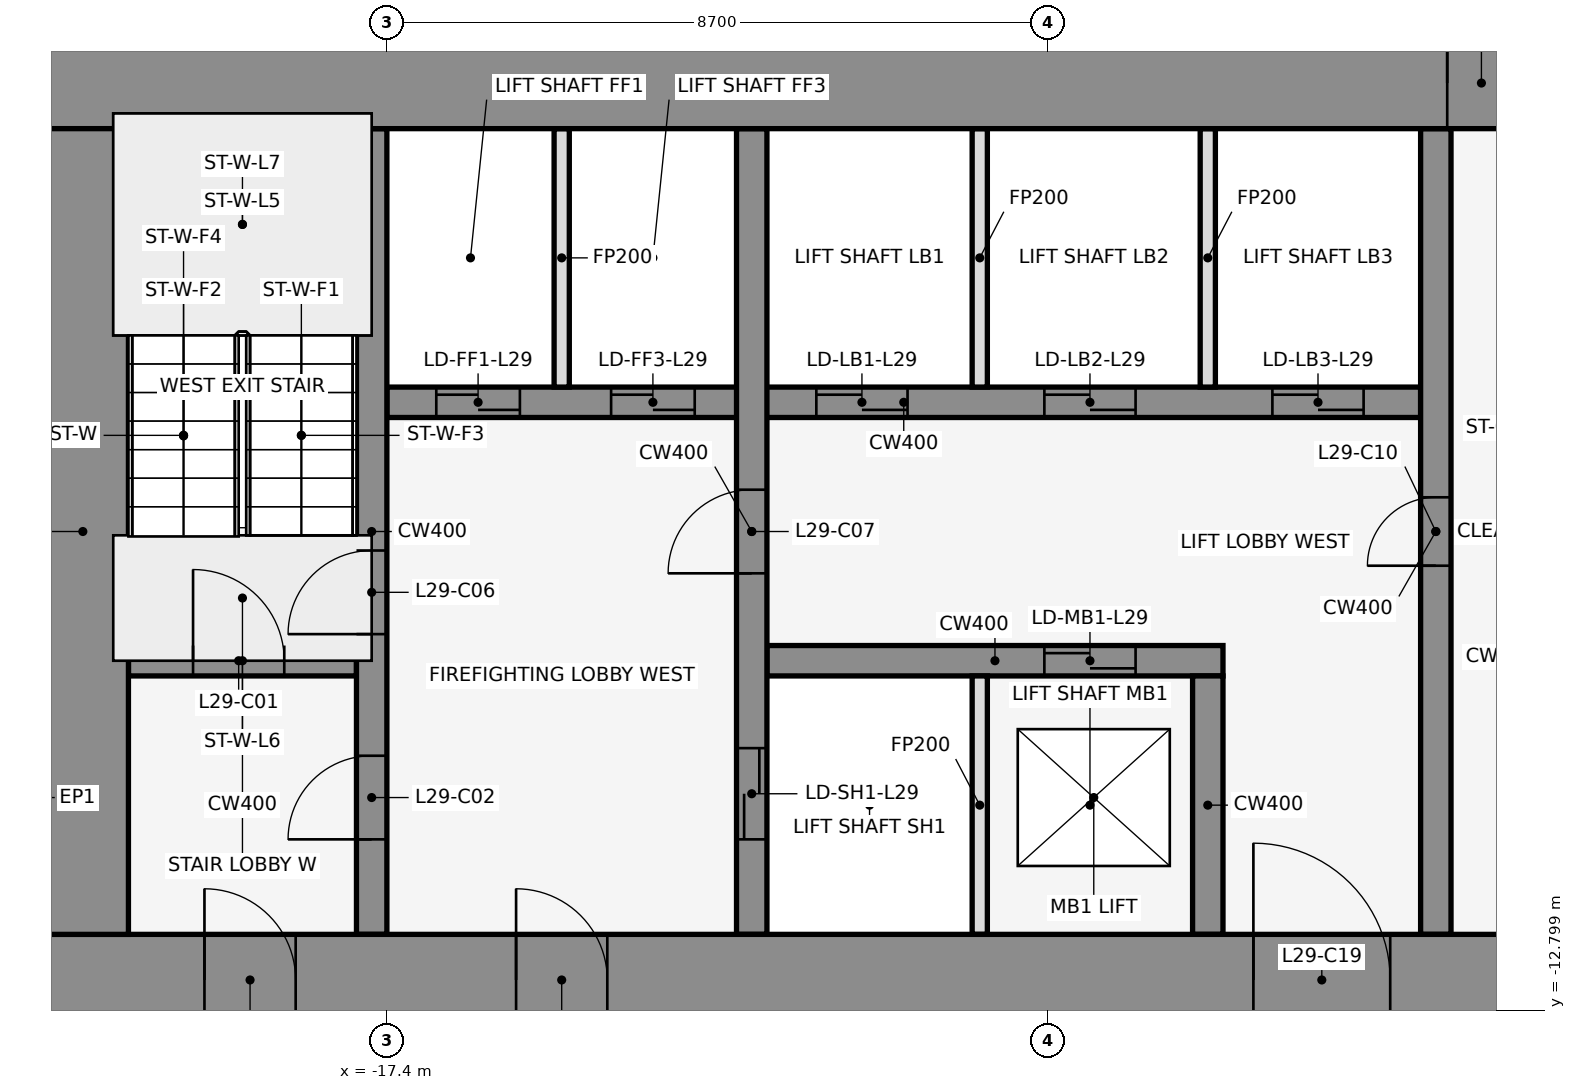
"""IFC4 building model, lengths in metres.
Left out: names, types, materials, properties, quantities, classifications, styles, units other than length and angle.
Written with IfcOpenShell. Run it as: python <this file> out.ifc"""

import sys

from ifc_helpers import new_model, si_unit, direction, frame, frame_2d, origin, place, context, subcontext, project, spatial, rectangle, extrude, element, fill, save


model = new_model("IFC4")
c1 = context("Model", 3, precision=1e-05, world=origin(), true_north=direction((0.0, 1.0)))
c2 = subcontext(c1, "Body", "Model", "MODEL_VIEW")
j1 = project(units=[si_unit("LENGTHUNIT", "METRE"), si_unit("PLANEANGLEUNIT", "RADIAN")], contexts=[c1])
p1 = place(None, origin())
s1 = spatial("IfcSite", under=j1, at=p1, CompositionType="ELEMENT")
p2 = place(p1, origin())
s2 = spatial("IfcBuilding", under=s1, at=p2, CompositionType="ELEMENT")
p3 = place(p2, frame((0.0, 0.0, 135.0)))
s3 = spatial("IfcBuildingStorey", under=s2, at=p3, CompositionType="ELEMENT", Elevation=135.0)
p4 = place(p3, frame((-14.599, 1.08, 0.0), z_axis=(0.0, 0.0, 1.0), x_axis=(-0.83981312244, -0.542875602121, 0.0)))
e1 = element("IfcWall", 1, at=p4, inside=s3, PredefinedType="STANDARD", context=c2, shape_type="SweptSolid", body=[
    extrude(rectangle(XDim=2.183, YDim=0.25, at=frame_2d((1.091, 0.0))), origin(), (0.0, 0.0, 1.0), 5.25),
])
p5 = place(p3, frame((-20.8, -8.2, 0.0), z_axis=(0.0, 0.0, 1.0), x_axis=(1.0, 0.0, 0.0)))
e2 = element("IfcWall", 2, at=p5, inside=s3, PredefinedType="SHEAR", context=c2, shape_type="SweptSolid", body=[
    extrude(rectangle(XDim=3.0, YDim=0.4, at=frame_2d((1.5, 0.0))), origin(), (0.0, 0.0, 1.0), 5.4),
])
p6 = place(p5, frame((0.85, 0.0, 0.0)))
e3 = element("IfcOpeningElement", 3, at=p6, cuts=e2, PredefinedType="OPENING", context=c2, shape_type="SweptSolid", body=[
    extrude(rectangle(XDim=1.2, YDim=2.1, at=frame_2d((0.6, 1.05))), frame((0.0, 0.212, 0.0), z_axis=(0.0, -1.0, 0.0), x_axis=(1.0, 0.0, 0.0)), (0.0, 0.0, 1.0), 0.424),
])
p7 = place(p3, frame((-12.4, -8.2, 0.0), z_axis=(0.0, 0.0, 1.0), x_axis=(1.0, 0.0, 0.0)))
e4 = element("IfcWall", 4, at=p7, inside=s3, PredefinedType="SHEAR", context=c2, shape_type="SweptSolid", body=[
    extrude(rectangle(XDim=6.0, YDim=0.4, at=frame_2d((3.0, 0.0))), origin(), (0.0, 0.0, 1.0), 5.4),
])
p8 = place(p7, frame((3.65, 0.0, 0.0)))
e5 = element("IfcOpeningElement", 5, at=p8, cuts=e4, PredefinedType="OPENING", context=c2, shape_type="SweptSolid", body=[
    extrude(rectangle(XDim=1.2, YDim=2.1, at=frame_2d((0.6, 1.05))), frame((0.0, 0.212, 0.0), z_axis=(0.0, -1.0, 0.0), x_axis=(1.0, 0.0, 0.0)), (0.0, 0.0, 1.0), 0.424),
])
p9 = place(p3, frame((-17.4, -4.8, 0.0), z_axis=(0.0, 0.0, 1.0), x_axis=(1.0, 0.0, 0.0)))
e6 = element("IfcWall", 6, at=p9, inside=s3, PredefinedType="SHEAR", context=c2, shape_type="SweptSolid", body=[
    extrude(rectangle(XDim=13.6, YDim=0.4, at=frame_2d((6.8, 0.0))), origin(), (0.0, 0.0, 1.0), 5.4),
])
p10 = place(p9, frame((0.65, 0.0, 0.0)))
e7 = element("IfcOpeningElement", 7, at=p10, cuts=e6, PredefinedType="OPENING", context=c2, shape_type="SweptSolid", body=[
    extrude(rectangle(XDim=1.1, YDim=2.1, at=frame_2d((0.55, 1.05))), frame((0.0, 0.212, 0.0), z_axis=(0.0, -1.0, 0.0), x_axis=(1.0, 0.0, 0.0)), (0.0, 0.0, 1.0), 0.424),
])
p11 = place(p9, frame((2.95, 0.0, 0.0)))
e8 = element("IfcOpeningElement", 8, at=p11, cuts=e6, PredefinedType="OPENING", context=c2, shape_type="SweptSolid", body=[
    extrude(rectangle(XDim=1.1, YDim=2.1, at=frame_2d((0.55, 1.05))), frame((0.0, 0.212, 0.0), z_axis=(0.0, -1.0, 0.0), x_axis=(1.0, 0.0, 0.0)), (0.0, 0.0, 1.0), 0.424),
])
p12 = place(p9, frame((5.65, 0.0, 0.0)))
e9 = element("IfcOpeningElement", 9, at=p12, cuts=e6, PredefinedType="OPENING", context=c2, shape_type="SweptSolid", body=[
    extrude(rectangle(XDim=1.2, YDim=2.1, at=frame_2d((0.6, 1.05))), frame((0.0, 0.212, 0.0), z_axis=(0.0, -1.0, 0.0), x_axis=(1.0, 0.0, 0.0)), (0.0, 0.0, 1.0), 0.424),
])
p13 = place(p9, frame((8.65, 0.0, 0.0)))
e10 = element("IfcOpeningElement", 10, at=p13, cuts=e6, PredefinedType="OPENING", context=c2, shape_type="SweptSolid", body=[
    extrude(rectangle(XDim=1.2, YDim=2.1, at=frame_2d((0.6, 1.05))), frame((0.0, 0.212, 0.0), z_axis=(0.0, -1.0, 0.0), x_axis=(1.0, 0.0, 0.0)), (0.0, 0.0, 1.0), 0.424),
])
p14 = place(p9, frame((11.65, 0.0, 0.0)))
e11 = element("IfcOpeningElement", 11, at=p14, cuts=e6, PredefinedType="OPENING", context=c2, shape_type="SweptSolid", body=[
    extrude(rectangle(XDim=1.2, YDim=2.1, at=frame_2d((0.6, 1.05))), frame((0.0, 0.212, 0.0), z_axis=(0.0, -1.0, 0.0), x_axis=(1.0, 0.0, 0.0)), (0.0, 0.0, 1.0), 0.424),
])
p15 = place(p3, frame((-17.6, -11.8, 0.0), z_axis=(0.0, 0.0, 1.0), x_axis=(0.0, 1.0, 0.0)))
e12 = element("IfcWall", 12, at=p15, inside=s3, PredefinedType="SHEAR", context=c2, shape_type="SweptSolid", body=[
    extrude(rectangle(XDim=10.6, YDim=0.4, at=frame_2d((5.3, 0.0))), origin(), (0.0, 0.0, 1.0), 5.4),
])
p16 = place(p15, frame((1.25, 0.0, 0.0)))
e13 = element("IfcOpeningElement", 13, at=p16, cuts=e12, PredefinedType="OPENING", context=c2, shape_type="SweptSolid", body=[
    extrude(rectangle(XDim=1.1, YDim=2.1, at=frame_2d((0.55, 1.05))), frame((0.0, 0.212, 0.0), z_axis=(0.0, -1.0, 0.0), x_axis=(1.0, 0.0, 0.0)), (0.0, 0.0, 1.0), 0.424),
])
p17 = place(p15, frame((3.95, 0.0, 0.0)))
e14 = element("IfcOpeningElement", 14, at=p17, cuts=e12, PredefinedType="OPENING", context=c2, shape_type="SweptSolid", body=[
    extrude(rectangle(XDim=1.1, YDim=2.1, at=frame_2d((0.55, 1.05))), frame((0.0, 0.212, 0.0), z_axis=(0.0, -1.0, 0.0), x_axis=(1.0, 0.0, 0.0)), (0.0, 0.0, 1.0), 0.424),
])
p18 = place(p3, frame((-15.1, -4.6, 0.0), z_axis=(0.0, 0.0, 1.0), x_axis=(0.0, 1.0, 0.0)))
e15 = element("IfcWall", 15, at=p18, inside=s3, PredefinedType="PARTITIONING", context=c2, shape_type="SweptSolid", body=[
    extrude(rectangle(XDim=3.4, YDim=0.2, at=frame_2d((1.7, 0.0))), origin(), (0.0, 0.0, 1.0), 4.24),
])
p19 = place(p3, frame((-12.6, -11.8, 0.0), z_axis=(0.0, 0.0, 1.0), x_axis=(0.0, 1.0, 0.0)))
e16 = element("IfcWall", 16, at=p19, inside=s3, PredefinedType="SHEAR", context=c2, shape_type="SweptSolid", body=[
    extrude(rectangle(XDim=10.6, YDim=0.4, at=frame_2d((5.3, 0.0))), origin(), (0.0, 0.0, 1.0), 5.4),
])
p20 = place(p19, frame((1.25, 0.0, 0.0)))
e17 = element("IfcOpeningElement", 17, at=p20, cuts=e16, PredefinedType="OPENING", context=c2, shape_type="SweptSolid", body=[
    extrude(rectangle(XDim=1.2, YDim=2.1, at=frame_2d((0.6, 1.05))), frame((0.0, 0.212, 0.0), z_axis=(0.0, -1.0, 0.0), x_axis=(1.0, 0.0, 0.0)), (0.0, 0.0, 1.0), 0.424),
])
p21 = place(p19, frame((4.75, 0.0, 0.0)))
e18 = element("IfcOpeningElement", 18, at=p21, cuts=e16, PredefinedType="OPENING", context=c2, shape_type="SweptSolid", body=[
    extrude(rectangle(XDim=1.1, YDim=2.1, at=frame_2d((0.55, 1.05))), frame((0.0, 0.212, 0.0), z_axis=(0.0, -1.0, 0.0), x_axis=(1.0, 0.0, 0.0)), (0.0, 0.0, 1.0), 0.424),
])
for number, where, z_axis, x_axis in (
    (19, (-9.6, -11.8, 0.0), (0.0, 0.0, 1.0), (0.0, 1.0, 0.0)),
    (20, (-9.6, -4.6, 0.0), (0.0, 0.0, 1.0), (0.0, 1.0, 0.0)),
):
    element("IfcWall", number, at=place(p3, frame(where, z_axis=z_axis, x_axis=x_axis)), inside=s3, PredefinedType="PARTITIONING", context=c2, shape_type="SweptSolid", body=[
        extrude(rectangle(XDim=3.4, YDim=0.2, at=frame_2d((1.7, 0.0))), origin(), (0.0, 0.0, 1.0), 4.24),
    ])
p22 = place(p3, frame((-6.6, -11.8, 0.0), z_axis=(0.0, 0.0, 1.0), x_axis=(0.0, 1.0, 0.0)))
e21 = element("IfcWall", 21, at=p22, inside=s3, PredefinedType="SHEAR", context=c2, shape_type="SweptSolid", body=[
    extrude(rectangle(XDim=3.4, YDim=0.4, at=frame_2d((1.7, 0.0))), origin(), (0.0, 0.0, 1.0), 5.4),
])
p23 = place(p3, frame((-6.6, -4.6, 0.0), z_axis=(0.0, 0.0, 1.0), x_axis=(0.0, 1.0, 0.0)))
e22 = element("IfcWall", 22, at=p23, inside=s3, PredefinedType="PARTITIONING", context=c2, shape_type="SweptSolid", body=[
    extrude(rectangle(XDim=3.4, YDim=0.2, at=frame_2d((1.7, 0.0))), origin(), (0.0, 0.0, 1.0), 4.24),
])
p24 = place(p3, frame((-3.6, -11.8, 0.0), z_axis=(0.0, 0.0, 1.0), x_axis=(0.0, 1.0, 0.0)))
e23 = element("IfcWall", 23, at=p24, inside=s3, PredefinedType="SHEAR", context=c2, shape_type="SweptSolid", body=[
    extrude(rectangle(XDim=10.6, YDim=0.4, at=frame_2d((5.3, 0.0))), origin(), (0.0, 0.0, 1.0), 5.4),
])
p25 = place(p24, frame((4.85, 0.0, 0.0)))
e24 = element("IfcOpeningElement", 24, at=p25, cuts=e23, PredefinedType="OPENING", context=c2, shape_type="SweptSolid", body=[
    extrude(rectangle(XDim=0.9, YDim=2.1, at=frame_2d((0.45, 1.05))), frame((0.0, 0.212, 0.0), z_axis=(0.0, -1.0, 0.0), x_axis=(1.0, 0.0, 0.0)), (0.0, 0.0, 1.0), 0.424),
])
p26 = place(p3, frame((-22.0, -0.6, 0.0), z_axis=(0.0, 0.0, 1.0), x_axis=(1.0, 0.0, 0.0)))
e25 = element("IfcWall", 25, at=p26, inside=s3, PredefinedType="SHEAR", context=c2, shape_type="SweptSolid", body=[
    extrude(rectangle(XDim=44.0, YDim=1.2, at=frame_2d((22.0, 0.0))), origin(), (0.0, 0.0, 1.0), 5.4),
])
p27 = place(p26, frame((18.55, 0.0, 0.0)))
e26 = element("IfcOpeningElement", 26, at=p27, cuts=e25, PredefinedType="OPENING", context=c2, shape_type="SweptSolid", body=[
    extrude(rectangle(XDim=0.9, YDim=2.1, at=frame_2d((0.45, 1.05))), frame((0.0, 0.612, 0.0), z_axis=(0.0, -1.0, 0.0), x_axis=(1.0, 0.0, 0.0)), (0.0, 0.0, 1.0), 1.224),
])
p28 = place(p26, frame((24.55, 0.0, 0.0)))
e27 = element("IfcOpeningElement", 27, at=p28, cuts=e25, PredefinedType="OPENING", context=c2, shape_type="SweptSolid", body=[
    extrude(rectangle(XDim=0.9, YDim=2.1, at=frame_2d((0.45, 1.05))), frame((0.0, 0.612, 0.0), z_axis=(0.0, -1.0, 0.0), x_axis=(1.0, 0.0, 0.0)), (0.0, 0.0, 1.0), 1.224),
])
p29 = place(p3, frame((-22.0, -12.4, 0.0), z_axis=(0.0, 0.0, 1.0), x_axis=(1.0, 0.0, 0.0)))
e28 = element("IfcWall", 28, at=p29, inside=s3, PredefinedType="SHEAR", context=c2, shape_type="SweptSolid", body=[
    extrude(rectangle(XDim=44.0, YDim=1.2, at=frame_2d((22.0, 0.0))), origin(), (0.0, 0.0, 1.0), 5.4),
])
p30 = place(p29, frame((2.2, 0.0, 0.0)))
e29 = element("IfcOpeningElement", 29, at=p30, cuts=e28, PredefinedType="OPENING", context=c2, shape_type="SweptSolid", body=[
    extrude(rectangle(XDim=1.2, YDim=2.1, at=frame_2d((0.6, 1.05))), frame((0.0, 0.612, 0.0), z_axis=(0.0, -1.0, 0.0), x_axis=(1.0, 0.0, 0.0)), (0.0, 0.0, 1.0), 1.224),
])
p31 = place(p29, frame((21.4, 0.0, 0.0)))
e30 = element("IfcOpeningElement", 30, at=p31, cuts=e28, PredefinedType="OPENING", context=c2, shape_type="SweptSolid", body=[
    extrude(rectangle(XDim=1.2, YDim=2.1, at=frame_2d((0.6, 1.05))), frame((0.0, 0.612, 0.0), z_axis=(0.0, -1.0, 0.0), x_axis=(1.0, 0.0, 0.0)), (0.0, 0.0, 1.0), 1.224),
])
p32 = place(p29, frame((40.6, 0.0, 0.0)))
e31 = element("IfcOpeningElement", 31, at=p32, cuts=e28, PredefinedType="OPENING", context=c2, shape_type="SweptSolid", body=[
    extrude(rectangle(XDim=1.2, YDim=2.1, at=frame_2d((0.6, 1.05))), frame((0.0, 0.612, 0.0), z_axis=(0.0, -1.0, 0.0), x_axis=(1.0, 0.0, 0.0)), (0.0, 0.0, 1.0), 1.224),
])
p33 = place(p29, frame((16.0, 0.0, 0.0)))
e32 = element("IfcOpeningElement", 32, at=p33, cuts=e28, PredefinedType="OPENING", context=c2, shape_type="SweptSolid", body=[
    extrude(rectangle(XDim=1.8, YDim=2.1, at=frame_2d((0.9, 1.05))), frame((0.0, 0.612, 0.0), z_axis=(0.0, -1.0, 0.0), x_axis=(1.0, 0.0, 0.0)), (0.0, 0.0, 1.0), 1.224),
])
p34 = place(p29, frame((6.3, 0.0, 0.0)))
e33 = element("IfcOpeningElement", 33, at=p34, cuts=e28, PredefinedType="OPENING", context=c2, shape_type="SweptSolid", body=[
    extrude(rectangle(XDim=1.2, YDim=2.1, at=frame_2d((0.6, 1.05))), frame((0.0, 0.612, 0.0), z_axis=(0.0, -1.0, 0.0), x_axis=(1.0, 0.0, 0.0)), (0.0, 0.0, 1.0), 1.224),
])
p35 = place(p29, frame((26.2, 0.0, 0.0)))
e34 = element("IfcOpeningElement", 34, at=p35, cuts=e28, PredefinedType="OPENING", context=c2, shape_type="SweptSolid", body=[
    extrude(rectangle(XDim=1.8, YDim=2.1, at=frame_2d((0.9, 1.05))), frame((0.0, 0.612, 0.0), z_axis=(0.0, -1.0, 0.0), x_axis=(1.0, 0.0, 0.0)), (0.0, 0.0, 1.0), 1.224),
])
p36 = place(p29, frame((36.5, 0.0, 0.0)))
e35 = element("IfcOpeningElement", 35, at=p36, cuts=e28, PredefinedType="OPENING", context=c2, shape_type="SweptSolid", body=[
    extrude(rectangle(XDim=1.2, YDim=2.1, at=frame_2d((0.6, 1.05))), frame((0.0, 0.612, 0.0), z_axis=(0.0, -1.0, 0.0), x_axis=(1.0, 0.0, 0.0)), (0.0, 0.0, 1.0), 1.224),
])
p37 = place(p3, frame((-21.4, -11.8, 0.0), z_axis=(0.0, 0.0, 1.0), x_axis=(0.0, 1.0, 0.0)))
e36 = element("IfcWall", 36, at=p37, inside=s3, PredefinedType="SHEAR", context=c2, shape_type="SweptSolid", body=[
    extrude(rectangle(XDim=10.6, YDim=1.2, at=frame_2d((5.3, 0.0))), origin(), (0.0, 0.0, 1.0), 5.4),
])
p38 = place(p6, origin())
e37 = element("IfcDoor", 37, at=p38, inside=s3, OperationType="SINGLE_SWING_LEFT", PredefinedType="DOOR", context=c2, shape_type="SweptSolid", body=[
    extrude(rectangle(XDim=1.2, YDim=2.1, at=frame_2d((0.6, 1.05))), frame((0.0, 0.025, 0.0), z_axis=(0.0, -1.0, 0.0), x_axis=(1.0, 0.0, 0.0)), (0.0, 0.0, 1.0), 0.05),
])
fill(e3, e37)
p39 = place(p16, frame((1.1, 0.0, 0.0), z_axis=(0.0, 0.0, 1.0), x_axis=(-1.0, 0.0, 0.0)))
e38 = element("IfcDoor", 38, at=p39, inside=s3, OperationType="SINGLE_SWING_LEFT", PredefinedType="DOOR", context=c2, shape_type="SweptSolid", body=[
    extrude(rectangle(XDim=1.1, YDim=2.1, at=frame_2d((0.55, 1.05))), frame((0.0, 0.025, 0.0), z_axis=(0.0, -1.0, 0.0), x_axis=(1.0, 0.0, 0.0)), (0.0, 0.0, 1.0), 0.05),
])
fill(e13, e38)
p40 = place(p10, origin())
e39 = element("IfcDoor", 39, at=p40, inside=s3, OperationType="DOUBLE_DOOR_SLIDING", PredefinedType="DOOR", context=c2, shape_type="SweptSolid", body=[
    extrude(rectangle(XDim=1.1, YDim=2.1, at=frame_2d((0.55, 1.05))), frame((0.0, 0.025, 0.0), z_axis=(0.0, -1.0, 0.0), x_axis=(1.0, 0.0, 0.0)), (0.0, 0.0, 1.0), 0.05),
])
fill(e7, e39)
p41 = place(p11, origin())
e40 = element("IfcDoor", 40, at=p41, inside=s3, OperationType="DOUBLE_DOOR_SLIDING", PredefinedType="DOOR", context=c2, shape_type="SweptSolid", body=[
    extrude(rectangle(XDim=1.1, YDim=2.1, at=frame_2d((0.55, 1.05))), frame((0.0, 0.025, 0.0), z_axis=(0.0, -1.0, 0.0), x_axis=(1.0, 0.0, 0.0)), (0.0, 0.0, 1.0), 0.05),
])
fill(e8, e40)
p42 = place(p12, origin())
e41 = element("IfcDoor", 41, at=p42, inside=s3, OperationType="DOUBLE_DOOR_SLIDING", PredefinedType="DOOR", context=c2, shape_type="SweptSolid", body=[
    extrude(rectangle(XDim=1.2, YDim=2.1, at=frame_2d((0.6, 1.05))), frame((0.0, 0.025, 0.0), z_axis=(0.0, -1.0, 0.0), x_axis=(1.0, 0.0, 0.0)), (0.0, 0.0, 1.0), 0.05),
])
fill(e9, e41)
p43 = place(p13, origin())
e42 = element("IfcDoor", 42, at=p43, inside=s3, OperationType="DOUBLE_DOOR_SLIDING", PredefinedType="DOOR", context=c2, shape_type="SweptSolid", body=[
    extrude(rectangle(XDim=1.2, YDim=2.1, at=frame_2d((0.6, 1.05))), frame((0.0, 0.025, 0.0), z_axis=(0.0, -1.0, 0.0), x_axis=(1.0, 0.0, 0.0)), (0.0, 0.0, 1.0), 0.05),
])
fill(e10, e42)
p44 = place(p14, origin())
e43 = element("IfcDoor", 43, at=p44, inside=s3, OperationType="DOUBLE_DOOR_SLIDING", PredefinedType="DOOR", context=c2, shape_type="SweptSolid", body=[
    extrude(rectangle(XDim=1.2, YDim=2.1, at=frame_2d((0.6, 1.05))), frame((0.0, 0.025, 0.0), z_axis=(0.0, -1.0, 0.0), x_axis=(1.0, 0.0, 0.0)), (0.0, 0.0, 1.0), 0.05),
])
fill(e11, e43)
p45 = place(p20, origin())
e44 = element("IfcDoor", 44, at=p45, inside=s3, OperationType="DOUBLE_DOOR_SLIDING", PredefinedType="DOOR", context=c2, shape_type="SweptSolid", body=[
    extrude(rectangle(XDim=1.2, YDim=2.1, at=frame_2d((0.6, 1.05))), frame((0.0, 0.025, 0.0), z_axis=(0.0, -1.0, 0.0), x_axis=(1.0, 0.0, 0.0)), (0.0, 0.0, 1.0), 0.05),
])
fill(e17, e44)
p46 = place(p8, origin())
e45 = element("IfcDoor", 45, at=p46, inside=s3, OperationType="DOUBLE_DOOR_SLIDING", PredefinedType="DOOR", context=c2, shape_type="SweptSolid", body=[
    extrude(rectangle(XDim=1.2, YDim=2.1, at=frame_2d((0.6, 1.05))), frame((0.0, 0.025, 0.0), z_axis=(0.0, -1.0, 0.0), x_axis=(1.0, 0.0, 0.0)), (0.0, 0.0, 1.0), 0.05),
])
fill(e5, e45)
p47 = place(p17, frame((1.1, 0.0, 0.0), z_axis=(0.0, 0.0, 1.0), x_axis=(-1.0, 0.0, 0.0)))
e46 = element("IfcDoor", 46, at=p47, inside=s3, OperationType="SINGLE_SWING_LEFT", PredefinedType="DOOR", context=c2, shape_type="SweptSolid", body=[
    extrude(rectangle(XDim=1.1, YDim=2.1, at=frame_2d((0.55, 1.05))), frame((0.0, 0.025, 0.0), z_axis=(0.0, -1.0, 0.0), x_axis=(1.0, 0.0, 0.0)), (0.0, 0.0, 1.0), 0.05),
])
fill(e14, e46)
p48 = place(p21, origin())
e47 = element("IfcDoor", 47, at=p48, inside=s3, OperationType="SINGLE_SWING_LEFT", PredefinedType="DOOR", context=c2, shape_type="SweptSolid", body=[
    extrude(rectangle(XDim=1.1, YDim=2.1, at=frame_2d((0.55, 1.05))), frame((0.0, 0.025, 0.0), z_axis=(0.0, -1.0, 0.0), x_axis=(1.0, 0.0, 0.0)), (0.0, 0.0, 1.0), 0.05),
])
fill(e18, e47)
p49 = place(p25, frame((0.9, 0.0, 0.0), z_axis=(0.0, 0.0, 1.0), x_axis=(-1.0, 0.0, 0.0)))
e48 = element("IfcDoor", 48, at=p49, inside=s3, OperationType="SINGLE_SWING_LEFT", PredefinedType="DOOR", context=c2, shape_type="SweptSolid", body=[
    extrude(rectangle(XDim=0.9, YDim=2.1, at=frame_2d((0.45, 1.05))), frame((0.0, 0.025, 0.0), z_axis=(0.0, -1.0, 0.0), x_axis=(1.0, 0.0, 0.0)), (0.0, 0.0, 1.0), 0.05),
])
fill(e24, e48)
p50 = place(p27, origin())
e49 = element("IfcDoor", 49, at=p50, inside=s3, OperationType="SINGLE_SWING_LEFT", PredefinedType="DOOR", context=c2, shape_type="SweptSolid", body=[
    extrude(rectangle(XDim=0.9, YDim=2.1, at=frame_2d((0.45, 1.05))), frame((0.0, 0.025, 0.0), z_axis=(0.0, -1.0, 0.0), x_axis=(1.0, 0.0, 0.0)), (0.0, 0.0, 1.0), 0.05),
])
fill(e26, e49)
p51 = place(p30, frame((1.2, 0.0, 0.0), z_axis=(0.0, 0.0, 1.0), x_axis=(-1.0, 0.0, 0.0)))
e50 = element("IfcDoor", 50, at=p51, inside=s3, OperationType="SINGLE_SWING_RIGHT", PredefinedType="DOOR", context=c2, shape_type="SweptSolid", body=[
    extrude(rectangle(XDim=1.2, YDim=2.1, at=frame_2d((0.6, 1.05))), frame((0.0, 0.025, 0.0), z_axis=(0.0, -1.0, 0.0), x_axis=(1.0, 0.0, 0.0)), (0.0, 0.0, 1.0), 0.05),
])
fill(e29, e50)
p52 = place(p33, origin())
e51 = element("IfcDoor", 51, at=p52, inside=s3, OperationType="SINGLE_SWING_LEFT", PredefinedType="DOOR", context=c2, shape_type="SweptSolid", body=[
    extrude(rectangle(XDim=1.8, YDim=2.1, at=frame_2d((0.9, 1.05))), frame((0.0, 0.025, 0.0), z_axis=(0.0, -1.0, 0.0), x_axis=(1.0, 0.0, 0.0)), (0.0, 0.0, 1.0), 0.05),
])
fill(e32, e51)
p53 = place(p34, frame((1.2, 0.0, 0.0), z_axis=(0.0, 0.0, 1.0), x_axis=(-1.0, 0.0, 0.0)))
e52 = element("IfcDoor", 52, at=p53, inside=s3, OperationType="SINGLE_SWING_RIGHT", PredefinedType="DOOR", context=c2, shape_type="SweptSolid", body=[
    extrude(rectangle(XDim=1.2, YDim=2.1, at=frame_2d((0.6, 1.05))), frame((0.0, 0.025, 0.0), z_axis=(0.0, -1.0, 0.0), x_axis=(1.0, 0.0, 0.0)), (0.0, 0.0, 1.0), 0.05),
])
fill(e33, e52)
save(model, sys.argv[1])
